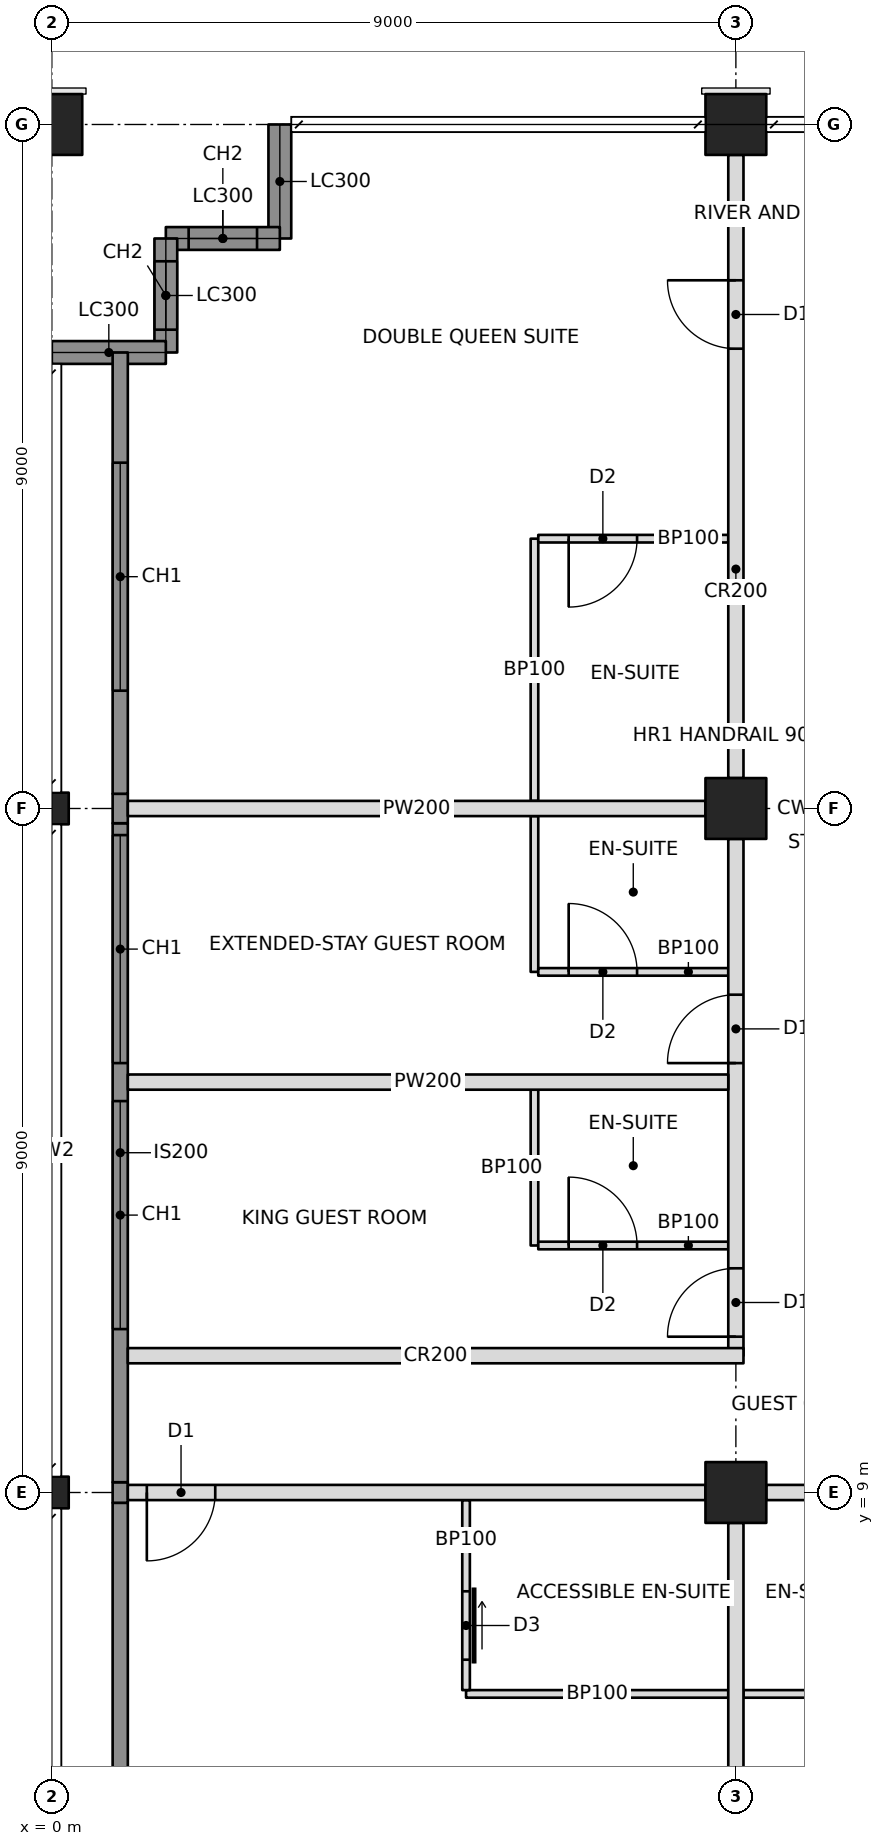
"""IFC4 building model, lengths in metres.
Left out: names, types, materials, properties, quantities, classifications, styles, units other than length and angle.
Written with IfcOpenShell. Run it as: python <this file> out.ifc"""

import sys

from ifc_helpers import new_model, si_unit, direction, frame, frame_2d, origin, origin_2d, place, context, subcontext, project, spatial, rectangle, hollow_rectangle, i_section, extrude, element, fill, save


model = new_model("IFC4")
c1 = context("Model", 3, precision=1e-05, world=origin(), true_north=direction((0.0, 1.0)))
c2 = subcontext(c1, "Body", "Model", "MODEL_VIEW")
j1 = project(units=[si_unit("LENGTHUNIT", "METRE"), si_unit("PLANEANGLEUNIT", "RADIAN")], contexts=[c1])
p1 = place(None, origin())
s1 = spatial("IfcSite", under=j1, at=p1, CompositionType="ELEMENT")
p2 = place(p1, origin())
s2 = spatial("IfcBuilding", under=s1, at=p2, CompositionType="ELEMENT")
p3 = place(p2, frame((0.0, 0.0, 259.0)))
s3 = spatial("IfcBuildingStorey", under=s2, at=p3, CompositionType="ELEMENT", Elevation=259.0)
for number, where, z_axis, x_axis in (
    (1, (0.0, 9.0, 0.0), (0.0, 0.0, 1.0), (0.0, 1.0, 0.0)),
    (2, (0.0, 18.0, 0.0), (0.0, 0.0, 1.0), (0.0, 1.0, 0.0)),
):
    element("IfcColumn", number, at=place(p3, frame(where, z_axis=z_axis, x_axis=x_axis)), inside=s3, PredefinedType="COLUMN", context=c2, shape_type="SweptSolid", body=[
        extrude(i_section(OverallWidth=0.417, OverallDepth=0.445, WebThickness=0.039, FlangeThickness=0.063, at=origin_2d()), origin(), (0.0, 0.0, 1.0), 3.6),
    ])
for number, where, z_axis, x_axis in (
    (3, (0.0, 27.0, 0.0), (0.0, 0.0, 1.0), (0.0, 1.0, 0.0)),
    (4, (9.0, 9.0, 0.0), (0.0, 0.0, 1.0), (1.0, 0.0, 0.0)),
    (5, (9.0, 18.0, 0.0), (0.0, 0.0, 1.0), (1.0, 0.0, 0.0)),
    (6, (9.0, 27.0, 0.0), (0.0, 0.0, 1.0), (1.0, 0.0, 0.0)),
):
    element("IfcColumn", number, at=place(p3, frame(where, z_axis=z_axis, x_axis=x_axis)), inside=s3, PredefinedType="COLUMN", context=c2, shape_type="SweptSolid", body=[
        extrude(hollow_rectangle(XDim=0.8, YDim=0.8, WallThickness=0.032, at=origin_2d()), origin(), (0.0, 0.0, 1.0), 3.6),
    ])
p4 = place(p3, frame((3.0, 27.0, 0.0), z_axis=(0.0, 0.0, 1.0), x_axis=(0.0, -1.0, 0.0)))
e7 = element("IfcWall", 7, at=p4, inside=s3, PredefinedType="SOLIDWALL", context=c2, shape_type="SweptSolid", body=[
    extrude(rectangle(XDim=1.5, YDim=0.3, at=frame_2d((0.75, 0.0))), origin(), (0.0, 0.0, 1.0), 2.62),
])
p5 = place(p3, frame((3.0, 25.5, 0.0), z_axis=(0.0, 0.0, 1.0), x_axis=(-1.0, 0.0, 0.0)))
e8 = element("IfcWall", 8, at=p5, inside=s3, PredefinedType="SOLIDWALL", context=c2, shape_type="SweptSolid", body=[
    extrude(rectangle(XDim=1.5, YDim=0.3, at=frame_2d((0.75, 0.0))), origin(), (0.0, 0.0, 1.0), 3.4),
])
p6 = place(p5, frame((0.3, 0.0, 0.6)))
e9 = element("IfcOpeningElement", 9, at=p6, cuts=e8, PredefinedType="OPENING", context=c2, shape_type="SweptSolid", body=[
    extrude(rectangle(XDim=0.9, YDim=2.2, at=frame_2d((0.45, 1.1))), frame((0.0, 0.16, 0.0), z_axis=(0.0, -1.0, 0.0), x_axis=(1.0, 0.0, 0.0)), (0.0, 0.0, 1.0), 0.32),
])
p7 = place(p3, frame((1.5, 25.5, 0.0), z_axis=(0.0, 0.0, 1.0), x_axis=(0.0, -1.0, 0.0)))
e10 = element("IfcWall", 10, at=p7, inside=s3, PredefinedType="SOLIDWALL", context=c2, shape_type="SweptSolid", body=[
    extrude(rectangle(XDim=1.5, YDim=0.3, at=frame_2d((0.75, 0.0))), origin(), (0.0, 0.0, 1.0), 3.4),
])
p8 = place(p7, frame((0.3, 0.0, 0.6)))
e11 = element("IfcOpeningElement", 11, at=p8, cuts=e10, PredefinedType="OPENING", context=c2, shape_type="SweptSolid", body=[
    extrude(rectangle(XDim=0.9, YDim=2.2, at=frame_2d((0.45, 1.1))), frame((0.0, 0.16, 0.0), z_axis=(0.0, -1.0, 0.0), x_axis=(1.0, 0.0, 0.0)), (0.0, 0.0, 1.0), 0.32),
])
p9 = place(p3, frame((1.5, 24.0, 0.0), z_axis=(0.0, 0.0, 1.0), x_axis=(-1.0, 0.0, 0.0)))
e12 = element("IfcWall", 12, at=p9, inside=s3, PredefinedType="SOLIDWALL", context=c2, shape_type="SweptSolid", body=[
    extrude(rectangle(XDim=1.5, YDim=0.3, at=frame_2d((0.75, 0.0))), origin(), (0.0, 0.0, 1.0), 2.62),
])
p10 = place(p3, frame((1.0, 9.0, 0.0), z_axis=(0.0, 0.0, 1.0), x_axis=(1.0, 0.0, 0.0)))
e13 = element("IfcWall", 13, at=p10, inside=s3, PredefinedType="PARTITIONING", context=c2, shape_type="SweptSolid", body=[
    extrude(rectangle(XDim=7.6, YDim=0.2, at=frame_2d((3.8, 0.0))), origin(), (0.0, 0.0, 1.0), 2.638),
])
p11 = place(p10, frame((0.25, 0.0, 0.0)))
e14 = element("IfcOpeningElement", 14, at=p11, cuts=e13, PredefinedType="OPENING", context=c2, shape_type="SweptSolid", body=[
    extrude(rectangle(XDim=0.9, YDim=2.1, at=frame_2d((0.45, 1.05))), frame((0.0, 0.11, 0.0), z_axis=(0.0, -1.0, 0.0), x_axis=(1.0, 0.0, 0.0)), (0.0, 0.0, 1.0), 0.22),
])
p12 = place(p3, frame((9.4, 9.0, 0.0), z_axis=(0.0, 0.0, 1.0), x_axis=(1.0, 0.0, 0.0)))
e15 = element("IfcWall", 15, at=p12, inside=s3, PredefinedType="PARTITIONING", context=c2, shape_type="SweptSolid", body=[
    extrude(rectangle(XDim=8.2, YDim=0.2, at=frame_2d((4.1, 0.0))), origin(), (0.0, 0.0, 1.0), 2.605),
])
p13 = place(p12, frame((2.95, 0.0, 0.0)))
e16 = element("IfcOpeningElement", 16, at=p13, cuts=e15, PredefinedType="OPENING", context=c2, shape_type="SweptSolid", body=[
    extrude(rectangle(XDim=0.9, YDim=2.1, at=frame_2d((0.45, 1.05))), frame((0.0, 0.11, 0.0), z_axis=(0.0, -1.0, 0.0), x_axis=(1.0, 0.0, 0.0)), (0.0, 0.0, 1.0), 0.22),
])
p14 = place(p12, frame((4.35, 0.0, 0.0)))
e17 = element("IfcOpeningElement", 17, at=p14, cuts=e15, PredefinedType="OPENING", context=c2, shape_type="SweptSolid", body=[
    extrude(rectangle(XDim=0.9, YDim=2.1, at=frame_2d((0.45, 1.05))), frame((0.0, 0.11, 0.0), z_axis=(0.0, -1.0, 0.0), x_axis=(1.0, 0.0, 0.0)), (0.0, 0.0, 1.0), 0.22),
])
p15 = place(p3, frame((9.0, 10.8, 0.0), z_axis=(0.0, 0.0, 1.0), x_axis=(0.0, 1.0, 0.0)))
e18 = element("IfcWall", 18, at=p15, inside=s3, PredefinedType="PARTITIONING", context=c2, shape_type="SweptSolid", body=[
    extrude(rectangle(XDim=6.8, YDim=0.2, at=frame_2d((3.4, 0.0))), origin(), (0.0, 0.0, 1.0), 2.605),
])
p16 = place(p15, frame((0.25, 0.0, 0.0)))
e19 = element("IfcOpeningElement", 19, at=p16, cuts=e18, PredefinedType="OPENING", context=c2, shape_type="SweptSolid", body=[
    extrude(rectangle(XDim=0.9, YDim=2.1, at=frame_2d((0.45, 1.05))), frame((0.0, 0.11, 0.0), z_axis=(0.0, -1.0, 0.0), x_axis=(1.0, 0.0, 0.0)), (0.0, 0.0, 1.0), 0.22),
])
p17 = place(p15, frame((3.85, 0.0, 0.0)))
e20 = element("IfcOpeningElement", 20, at=p17, cuts=e18, PredefinedType="OPENING", context=c2, shape_type="SweptSolid", body=[
    extrude(rectangle(XDim=0.9, YDim=2.1, at=frame_2d((0.45, 1.05))), frame((0.0, 0.11, 0.0), z_axis=(0.0, -1.0, 0.0), x_axis=(1.0, 0.0, 0.0)), (0.0, 0.0, 1.0), 0.22),
])
p18 = place(p3, frame((9.0, 18.4, 0.0), z_axis=(0.0, 0.0, 1.0), x_axis=(0.0, 1.0, 0.0)))
e21 = element("IfcWall", 21, at=p18, inside=s3, PredefinedType="PARTITIONING", context=c2, shape_type="SweptSolid", body=[
    extrude(rectangle(XDim=8.2, YDim=0.2, at=frame_2d((4.1, 0.0))), origin(), (0.0, 0.0, 1.0), 2.605),
])
p19 = place(p18, frame((5.65, 0.0, 0.0)))
e22 = element("IfcOpeningElement", 22, at=p19, cuts=e21, PredefinedType="OPENING", context=c2, shape_type="SweptSolid", body=[
    extrude(rectangle(XDim=0.9, YDim=2.1, at=frame_2d((0.45, 1.05))), frame((0.0, 0.11, 0.0), z_axis=(0.0, -1.0, 0.0), x_axis=(1.0, 0.0, 0.0)), (0.0, 0.0, 1.0), 0.22),
])
p20 = place(p3, frame((1.0, 10.8, 0.0), z_axis=(0.0, 0.0, 1.0), x_axis=(1.0, 0.0, 0.0)))
e23 = element("IfcWall", 23, at=p20, inside=s3, PredefinedType="PARTITIONING", context=c2, shape_type="SweptSolid", body=[
    extrude(rectangle(XDim=8.1, YDim=0.2, at=frame_2d((4.05, 0.0))), origin(), (0.0, 0.0, 1.0), 2.604),
])
p21 = place(p3, frame((9.0, 8.6, 0.0), z_axis=(0.0, 0.0, 1.0), x_axis=(0.0, -1.0, 0.0)))
e24 = element("IfcWall", 24, at=p21, inside=s3, PredefinedType="PARTITIONING", context=c2, shape_type="SweptSolid", body=[
    extrude(rectangle(XDim=7.6, YDim=0.2, at=frame_2d((3.8, 0.0))), origin(), (0.0, 0.0, 1.0), 2.638),
])
p22 = place(p3, frame((5.45, 6.35, 0.0), z_axis=(0.0, 0.0, 1.0), x_axis=(1.0, 0.0, 0.0)))
e25 = element("IfcWall", 25, at=p22, inside=s3, PredefinedType="PARTITIONING", context=c2, shape_type="SweptSolid", body=[
    extrude(rectangle(XDim=3.45, YDim=0.1, at=frame_2d((1.725, 0.0))), origin(), (0.0, 0.0, 1.0), 2.638),
])
p23 = place(p3, frame((5.45, 8.9, 0.0), z_axis=(0.0, 0.0, 1.0), x_axis=(0.0, -1.0, 0.0)))
e26 = element("IfcWall", 26, at=p23, inside=s3, PredefinedType="PARTITIONING", context=c2, shape_type="SweptSolid", body=[
    extrude(rectangle(XDim=2.5, YDim=0.1, at=frame_2d((1.25, 0.0))), origin(), (0.0, 0.0, 1.0), 2.638),
])
p24 = place(p23, frame((1.2, 0.0, 0.0)))
e27 = element("IfcOpeningElement", 27, at=p24, cuts=e26, PredefinedType="OPENING", context=c2, shape_type="SweptSolid", body=[
    extrude(rectangle(XDim=0.9, YDim=2.1, at=frame_2d((0.45, 1.05))), frame((0.0, 0.06, 0.0), z_axis=(0.0, -1.0, 0.0), x_axis=(1.0, 0.0, 0.0)), (0.0, 0.0, 1.0), 0.12),
])
p25 = place(p3, frame((9.1, 6.35, 0.0), z_axis=(0.0, 0.0, 1.0), x_axis=(1.0, 0.0, 0.0)))
e28 = element("IfcWall", 28, at=p25, inside=s3, PredefinedType="PARTITIONING", context=c2, shape_type="SweptSolid", body=[
    extrude(rectangle(XDim=2.95, YDim=0.1, at=frame_2d((1.475, 0.0))), origin(), (0.0, 0.0, 1.0), 2.638),
])
p26 = place(p3, frame((8.9, 14.4, 0.0), z_axis=(0.0, 0.0, 1.0), x_axis=(-1.0, 0.0, 0.0)))
e29 = element("IfcWall", 29, at=p26, inside=s3, PredefinedType="PARTITIONING", context=c2, shape_type="SweptSolid", body=[
    extrude(rectangle(XDim=7.9, YDim=0.2, at=frame_2d((3.95, 0.0))), origin(), (0.0, 0.0, 1.0), 2.604),
])
p27 = place(p3, frame((8.6, 18.0, 0.0), z_axis=(0.0, 0.0, 1.0), x_axis=(-1.0, 0.0, 0.0)))
e30 = element("IfcWall", 30, at=p27, inside=s3, PredefinedType="PARTITIONING", context=c2, shape_type="SweptSolid", body=[
    extrude(rectangle(XDim=7.6, YDim=0.2, at=frame_2d((3.8, 0.0))), origin(), (0.0, 0.0, 1.0), 2.605),
])
p28 = place(p3, frame((6.35, 12.25, 0.0), z_axis=(0.0, 0.0, 1.0), x_axis=(0.0, 1.0, 0.0)))
e31 = element("IfcWall", 31, at=p28, inside=s3, PredefinedType="PARTITIONING", context=c2, shape_type="SweptSolid", body=[
    extrude(rectangle(XDim=2.05, YDim=0.1, at=frame_2d((1.025, 0.0))), origin(), (0.0, 0.0, 1.0), 3.4),
])
p29 = place(p3, frame((8.9, 12.25, 0.0), z_axis=(0.0, 0.0, 1.0), x_axis=(-1.0, 0.0, 0.0)))
e32 = element("IfcWall", 32, at=p29, inside=s3, PredefinedType="PARTITIONING", context=c2, shape_type="SweptSolid", body=[
    extrude(rectangle(XDim=2.5, YDim=0.1, at=frame_2d((1.25, 0.0))), origin(), (0.0, 0.0, 1.0), 2.604),
])
p30 = place(p29, frame((1.2, 0.0, 0.0)))
e33 = element("IfcOpeningElement", 33, at=p30, cuts=e32, PredefinedType="OPENING", context=c2, shape_type="SweptSolid", body=[
    extrude(rectangle(XDim=0.9, YDim=2.1, at=frame_2d((0.45, 1.05))), frame((0.0, 0.06, 0.0), z_axis=(0.0, -1.0, 0.0), x_axis=(1.0, 0.0, 0.0)), (0.0, 0.0, 1.0), 0.12),
])
p31 = place(p3, frame((6.35, 15.85, 0.0), z_axis=(0.0, 0.0, 1.0), x_axis=(0.0, 1.0, 0.0)))
e34 = element("IfcWall", 34, at=p31, inside=s3, PredefinedType="PARTITIONING", context=c2, shape_type="SweptSolid", body=[
    extrude(rectangle(XDim=2.05, YDim=0.1, at=frame_2d((1.025, 0.0))), origin(), (0.0, 0.0, 1.0), 2.604),
])
p32 = place(p3, frame((8.9, 15.85, 0.0), z_axis=(0.0, 0.0, 1.0), x_axis=(-1.0, 0.0, 0.0)))
e35 = element("IfcWall", 35, at=p32, inside=s3, PredefinedType="PARTITIONING", context=c2, shape_type="SweptSolid", body=[
    extrude(rectangle(XDim=2.5, YDim=0.1, at=frame_2d((1.25, 0.0))), origin(), (0.0, 0.0, 1.0), 2.604),
])
p33 = place(p32, frame((1.2, 0.0, 0.0)))
e36 = element("IfcOpeningElement", 36, at=p33, cuts=e35, PredefinedType="OPENING", context=c2, shape_type="SweptSolid", body=[
    extrude(rectangle(XDim=0.9, YDim=2.1, at=frame_2d((0.45, 1.05))), frame((0.0, 0.06, 0.0), z_axis=(0.0, -1.0, 0.0), x_axis=(1.0, 0.0, 0.0)), (0.0, 0.0, 1.0), 0.12),
])
p34 = place(p3, frame((6.35, 18.1, 0.0), z_axis=(0.0, 0.0, 1.0), x_axis=(0.0, 1.0, 0.0)))
e37 = element("IfcWall", 37, at=p34, inside=s3, PredefinedType="PARTITIONING", context=c2, shape_type="SweptSolid", body=[
    extrude(rectangle(XDim=3.45, YDim=0.1, at=frame_2d((1.725, 0.0))), origin(), (0.0, 0.0, 1.0), 2.604),
])
p35 = place(p3, frame((8.9, 21.55, 0.0), z_axis=(0.0, 0.0, 1.0), x_axis=(-1.0, 0.0, 0.0)))
e38 = element("IfcWall", 38, at=p35, inside=s3, PredefinedType="PARTITIONING", context=c2, shape_type="SweptSolid", body=[
    extrude(rectangle(XDim=2.5, YDim=0.1, at=frame_2d((1.25, 0.0))), origin(), (0.0, 0.0, 1.0), 2.604),
])
p36 = place(p35, frame((1.2, 0.0, 0.0)))
e39 = element("IfcOpeningElement", 39, at=p36, cuts=e38, PredefinedType="OPENING", context=c2, shape_type="SweptSolid", body=[
    extrude(rectangle(XDim=0.9, YDim=2.1, at=frame_2d((0.45, 1.05))), frame((0.0, 0.06, 0.0), z_axis=(0.0, -1.0, 0.0), x_axis=(1.0, 0.0, 0.0)), (0.0, 0.0, 1.0), 0.12),
])
p37 = place(p3, frame((0.9, 4.607, 0.0), z_axis=(0.0, 0.0, 1.0), x_axis=(0.0, 1.0, 0.0)))
e40 = element("IfcWall", 40, at=p37, inside=s3, PredefinedType="SOLIDWALL", context=c2, shape_type="SweptSolid", body=[
    extrude(rectangle(XDim=4.257, YDim=0.2, at=frame_2d((2.129, 0.0))), origin(), (0.0, 0.0, 1.0), 3.4),
])
p38 = place(p3, frame((0.9, 8.865, 0.0), z_axis=(0.0, 0.0, 1.0), x_axis=(0.0, 1.0, 0.0)))
e41 = element("IfcWall", 41, at=p38, inside=s3, PredefinedType="SOLIDWALL", context=c2, shape_type="SweptSolid", body=[
    extrude(rectangle(XDim=0.271, YDim=0.2, at=frame_2d((0.135, 0.0))), origin(), (0.0, 0.0, 1.0), 2.638),
])
p39 = place(p3, frame((0.9, 9.135, 0.0), z_axis=(0.0, 0.0, 1.0), x_axis=(0.0, 1.0, 0.0)))
e42 = element("IfcWall", 42, at=p39, inside=s3, PredefinedType="SOLIDWALL", context=c2, shape_type="SweptSolid", body=[
    extrude(rectangle(XDim=8.671, YDim=0.2, at=frame_2d((4.335, 0.0))), origin(), (0.0, 0.0, 1.0), 3.4),
])
p40 = place(p39, frame((2.015, 0.0, 0.6)))
e43 = element("IfcOpeningElement", 43, at=p40, cuts=e42, PredefinedType="OPENING", context=c2, shape_type="SweptSolid", body=[
    extrude(rectangle(XDim=3.0, YDim=2.2, at=frame_2d((1.5, 1.1))), frame((0.0, 0.11, 0.0), z_axis=(0.0, -1.0, 0.0), x_axis=(1.0, 0.0, 0.0)), (0.0, 0.0, 1.0), 0.22),
])
p41 = place(p39, frame((5.515, 0.0, 0.6)))
e44 = element("IfcOpeningElement", 44, at=p41, cuts=e42, PredefinedType="OPENING", context=c2, shape_type="SweptSolid", body=[
    extrude(rectangle(XDim=3.0, YDim=2.2, at=frame_2d((1.5, 1.1))), frame((0.0, 0.11, 0.0), z_axis=(0.0, -1.0, 0.0), x_axis=(1.0, 0.0, 0.0)), (0.0, 0.0, 1.0), 0.22),
])
p42 = place(p3, frame((0.9, 17.806, 0.0), z_axis=(0.0, 0.0, 1.0), x_axis=(0.0, 1.0, 0.0)))
e45 = element("IfcWall", 45, at=p42, inside=s3, PredefinedType="SOLIDWALL", context=c2, shape_type="SweptSolid", body=[
    extrude(rectangle(XDim=0.388, YDim=0.2, at=frame_2d((0.194, 0.0))), origin(), (0.0, 0.0, 1.0), 2.604),
])
p43 = place(p3, frame((0.9, 18.194, 0.0), z_axis=(0.0, 0.0, 1.0), x_axis=(0.0, 1.0, 0.0)))
e46 = element("IfcWall", 46, at=p43, inside=s3, PredefinedType="SOLIDWALL", context=c2, shape_type="SweptSolid", body=[
    extrude(rectangle(XDim=5.806, YDim=0.2, at=frame_2d((2.903, 0.0))), origin(), (0.0, 0.0, 1.0), 3.4),
])
p44 = place(p43, frame((1.356, 0.0, 0.6)))
e47 = element("IfcOpeningElement", 47, at=p44, cuts=e46, PredefinedType="OPENING", context=c2, shape_type="SweptSolid", body=[
    extrude(rectangle(XDim=3.0, YDim=2.2, at=frame_2d((1.5, 1.1))), frame((0.0, 0.11, 0.0), z_axis=(0.0, -1.0, 0.0), x_axis=(1.0, 0.0, 0.0)), (0.0, 0.0, 1.0), 0.22),
])
p45 = place(p6, origin())
e48 = element("IfcWindow", 48, at=p45, inside=s3, PartitioningType="SINGLE_PANEL", PredefinedType="WINDOW", context=c2, shape_type="SweptSolid", body=[
    extrude(rectangle(XDim=0.9, YDim=2.2, at=frame_2d((0.45, 1.1))), frame((0.0, 0.03, 0.0), z_axis=(0.0, -1.0, 0.0), x_axis=(1.0, 0.0, 0.0)), (0.0, 0.0, 1.0), 0.06),
])
fill(e9, e48)
p46 = place(p8, origin())
e49 = element("IfcWindow", 49, at=p46, inside=s3, PartitioningType="SINGLE_PANEL", PredefinedType="WINDOW", context=c2, shape_type="SweptSolid", body=[
    extrude(rectangle(XDim=0.9, YDim=2.2, at=frame_2d((0.45, 1.1))), frame((0.0, 0.03, 0.0), z_axis=(0.0, -1.0, 0.0), x_axis=(1.0, 0.0, 0.0)), (0.0, 0.0, 1.0), 0.06),
])
fill(e11, e49)
p47 = place(p40, origin())
e50 = element("IfcWindow", 50, at=p47, inside=s3, PartitioningType="TRIPLE_PANEL_VERTICAL", PredefinedType="WINDOW", context=c2, shape_type="SweptSolid", body=[
    extrude(rectangle(XDim=3.0, YDim=2.2, at=frame_2d((1.5, 1.1))), frame((0.0, 0.03, 0.0), z_axis=(0.0, -1.0, 0.0), x_axis=(1.0, 0.0, 0.0)), (0.0, 0.0, 1.0), 0.06),
])
fill(e43, e50)
p48 = place(p41, origin())
e51 = element("IfcWindow", 51, at=p48, inside=s3, PartitioningType="TRIPLE_PANEL_VERTICAL", PredefinedType="WINDOW", context=c2, shape_type="SweptSolid", body=[
    extrude(rectangle(XDim=3.0, YDim=2.2, at=frame_2d((1.5, 1.1))), frame((0.0, 0.03, 0.0), z_axis=(0.0, -1.0, 0.0), x_axis=(1.0, 0.0, 0.0)), (0.0, 0.0, 1.0), 0.06),
])
fill(e44, e51)
p49 = place(p44, origin())
e52 = element("IfcWindow", 52, at=p49, inside=s3, PartitioningType="TRIPLE_PANEL_VERTICAL", PredefinedType="WINDOW", context=c2, shape_type="SweptSolid", body=[
    extrude(rectangle(XDim=3.0, YDim=2.2, at=frame_2d((1.5, 1.1))), frame((0.0, 0.03, 0.0), z_axis=(0.0, -1.0, 0.0), x_axis=(1.0, 0.0, 0.0)), (0.0, 0.0, 1.0), 0.06),
])
fill(e47, e52)
p50 = place(p24, origin())
e53 = element("IfcDoor", 53, at=p50, inside=s3, OperationType="SLIDING_TO_LEFT", PredefinedType="DOOR", context=c2, shape_type="SweptSolid", body=[
    extrude(rectangle(XDim=0.9, YDim=2.1, at=frame_2d((0.45, 1.05))), frame((0.0, 0.025, 0.0), z_axis=(0.0, -1.0, 0.0), x_axis=(1.0, 0.0, 0.0)), (0.0, 0.0, 1.0), 0.05),
])
fill(e27, e53)
p51 = place(p11, frame((0.9, 0.0, 0.0), z_axis=(0.0, 0.0, 1.0), x_axis=(-1.0, 0.0, 0.0)))
e54 = element("IfcDoor", 54, at=p51, inside=s3, OperationType="SINGLE_SWING_RIGHT", PredefinedType="DOOR", context=c2, shape_type="SweptSolid", body=[
    extrude(rectangle(XDim=0.9, YDim=2.1, at=frame_2d((0.45, 1.05))), frame((0.0, 0.025, 0.0), z_axis=(0.0, -1.0, 0.0), x_axis=(1.0, 0.0, 0.0)), (0.0, 0.0, 1.0), 0.05),
])
fill(e14, e54)
p52 = place(p30, frame((0.9, 0.0, 0.0), z_axis=(0.0, 0.0, 1.0), x_axis=(-1.0, 0.0, 0.0)))
e55 = element("IfcDoor", 55, at=p52, inside=s3, OperationType="SINGLE_SWING_LEFT", PredefinedType="DOOR", context=c2, shape_type="SweptSolid", body=[
    extrude(rectangle(XDim=0.9, YDim=2.1, at=frame_2d((0.45, 1.05))), frame((0.0, 0.025, 0.0), z_axis=(0.0, -1.0, 0.0), x_axis=(1.0, 0.0, 0.0)), (0.0, 0.0, 1.0), 0.05),
])
fill(e33, e55)
p53 = place(p16, origin())
e56 = element("IfcDoor", 56, at=p53, inside=s3, OperationType="SINGLE_SWING_LEFT", PredefinedType="DOOR", context=c2, shape_type="SweptSolid", body=[
    extrude(rectangle(XDim=0.9, YDim=2.1, at=frame_2d((0.45, 1.05))), frame((0.0, 0.025, 0.0), z_axis=(0.0, -1.0, 0.0), x_axis=(1.0, 0.0, 0.0)), (0.0, 0.0, 1.0), 0.05),
])
fill(e19, e56)
p54 = place(p33, frame((0.9, 0.0, 0.0), z_axis=(0.0, 0.0, 1.0), x_axis=(-1.0, 0.0, 0.0)))
e57 = element("IfcDoor", 57, at=p54, inside=s3, OperationType="SINGLE_SWING_LEFT", PredefinedType="DOOR", context=c2, shape_type="SweptSolid", body=[
    extrude(rectangle(XDim=0.9, YDim=2.1, at=frame_2d((0.45, 1.05))), frame((0.0, 0.025, 0.0), z_axis=(0.0, -1.0, 0.0), x_axis=(1.0, 0.0, 0.0)), (0.0, 0.0, 1.0), 0.05),
])
fill(e36, e57)
p55 = place(p17, origin())
e58 = element("IfcDoor", 58, at=p55, inside=s3, OperationType="SINGLE_SWING_LEFT", PredefinedType="DOOR", context=c2, shape_type="SweptSolid", body=[
    extrude(rectangle(XDim=0.9, YDim=2.1, at=frame_2d((0.45, 1.05))), frame((0.0, 0.025, 0.0), z_axis=(0.0, -1.0, 0.0), x_axis=(1.0, 0.0, 0.0)), (0.0, 0.0, 1.0), 0.05),
])
fill(e20, e58)
p56 = place(p36, origin())
e59 = element("IfcDoor", 59, at=p56, inside=s3, OperationType="SINGLE_SWING_RIGHT", PredefinedType="DOOR", context=c2, shape_type="SweptSolid", body=[
    extrude(rectangle(XDim=0.9, YDim=2.1, at=frame_2d((0.45, 1.05))), frame((0.0, 0.025, 0.0), z_axis=(0.0, -1.0, 0.0), x_axis=(1.0, 0.0, 0.0)), (0.0, 0.0, 1.0), 0.05),
])
fill(e39, e59)
p57 = place(p19, origin())
e60 = element("IfcDoor", 60, at=p57, inside=s3, OperationType="SINGLE_SWING_RIGHT", PredefinedType="DOOR", context=c2, shape_type="SweptSolid", body=[
    extrude(rectangle(XDim=0.9, YDim=2.1, at=frame_2d((0.45, 1.05))), frame((0.0, 0.025, 0.0), z_axis=(0.0, -1.0, 0.0), x_axis=(1.0, 0.0, 0.0)), (0.0, 0.0, 1.0), 0.05),
])
fill(e22, e60)
save(model, sys.argv[1])
